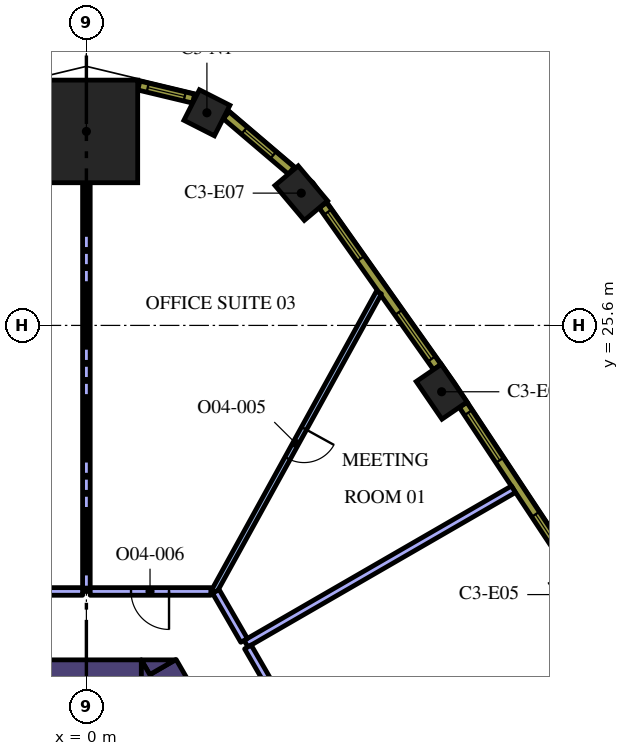
"""IFC4 building model, lengths in metres.
Left out: names, types, materials, properties, quantities, classifications, styles, units other than length and angle.
Written with IfcOpenShell. Run it as: python <this file> out.ifc"""

import sys

from ifc_helpers import new_model, si_unit, direction, frame, frame_2d, origin, origin_2d, place, context, subcontext, project, spatial, polyline, rectangle, outline, extrude, element, fill, save


model = new_model("IFC4")
c1 = context("Model", 3, precision=1e-05, world=origin(), true_north=direction((0.0, 1.0)))
c2 = subcontext(c1, "Body", "Model", "MODEL_VIEW")
j1 = project(units=[si_unit("LENGTHUNIT", "METRE"), si_unit("PLANEANGLEUNIT", "RADIAN")], contexts=[c1])
p1 = place(None, origin())
s1 = spatial("IfcSite", under=j1, at=p1, CompositionType="ELEMENT")
p2 = place(p1, origin())
s2 = spatial("IfcBuilding", under=s1, at=p2, CompositionType="ELEMENT")
p3 = place(p2, frame((0.0, 0.0, 187.8)))
s3 = spatial("IfcBuildingStorey", under=s2, at=p3, CompositionType="ELEMENT", Elevation=187.8)
p4 = place(p3, frame((0.0, 30.704, 0.0), z_axis=(0.0, 0.0, 1.0), x_axis=(0.0, 1.0, 0.0)))
e1 = element("IfcColumn", 1, at=p4, inside=s3, PredefinedType="COLUMN", context=c2, shape_type="SweptSolid", body=[
    extrude(rectangle(XDim=2.7, YDim=2.7, at=origin_2d()), origin(), (0.0, 0.0, 1.0), 4.2),
])
for number, where, z_axis, x_axis in (
    (2, (9.348, 23.854, 0.0), (0.0, 0.0, 1.0), (-0.565, 0.825, 0.0)),
    (3, (5.654, 29.081, 0.0), (0.0, 0.0, 1.0), (-0.644, 0.765, 0.0)),
):
    element("IfcColumn", number, at=place(p3, frame(where, z_axis=z_axis, x_axis=x_axis)), inside=s3, PredefinedType="COLUMN", context=c2, shape_type="SweptSolid", body=[
        extrude(rectangle(XDim=1.2, YDim=0.8, at=origin_2d()), origin(), (0.0, 0.0, 1.0), 4.2),
    ])
p5 = place(p3, frame((3.171, 31.195, 0.0), z_axis=(0.0, 0.0, 1.0), x_axis=(-0.891486197647, 0.453047855535, 0.0)))
e4 = element("IfcColumn", 4, at=p5, inside=s3, PredefinedType="COLUMN", context=c2, shape_type="SweptSolid", body=[
    extrude(rectangle(XDim=0.9, YDim=0.9, at=origin_2d()), origin(), (0.0, 0.0, 1.0), 4.2),
])
p6 = place(p3, frame((5.549, 10.489, 0.0), z_axis=(0.0, 0.0, 1.0), x_axis=(-0.50001746176, 0.866015321998, 0.0)))
e5 = element("IfcWall", 5, at=p6, inside=s3, PredefinedType="SOLIDWALL", context=c2, shape_type="SweptSolid", body=[
    extrude(rectangle(XDim=7.068, YDim=0.8, at=frame_2d((3.534, 0.0))), origin(), (0.0, 0.0, 1.0), 4.2),
])
p7 = place(p3, origin())
e6 = element("IfcWall", 6, at=p7, inside=s3, PredefinedType="SOLIDWALL", context=c2, shape_type="SweptSolid", body=[
    extrude(outline(polyline([(1.443, 16.8), (2.339, 16.8), (1.667, 16.412), (1.443, 16.8)])), origin(), (0.0, 0.0, 1.0), 4.2),
])
p8 = place(p3, frame((-2.379, 16.4, 0.0), z_axis=(0.0, 0.0, 1.0), x_axis=(1.0, 0.0, 0.0)))
e7 = element("IfcWall", 7, at=p8, inside=s3, PredefinedType="SOLIDWALL", context=c2, shape_type="SweptSolid", body=[
    extrude(rectangle(XDim=3.824, YDim=0.8, at=frame_2d((1.912, 0.0))), origin(), (0.0, 0.0, 1.0), 4.2),
])
e8 = element("IfcWall", 8, at=p7, inside=s3, PredefinedType="SOLIDWALL", context=c2, shape_type="SweptSolid", body=[
    extrude(outline(polyline([(1.905, 16.0), (1.447, 16.0), (1.447, 16.793), (1.905, 16.0)])), origin(), (0.0, 0.0, 1.0), 4.2),
])
p9 = place(p3, frame((4.2, 17.226, 0.0), z_axis=(0.0, 0.0, 1.0), x_axis=(0.866021486214, 0.500006785369, 0.0)))
e9 = element("IfcWall", 9, at=p9, inside=s3, PredefinedType="PARTITIONING", context=c2, shape_type="SweptSolid", body=[
    extrude(rectangle(XDim=8.126, YDim=0.2, at=frame_2d((4.063, 0.0))), origin(), (0.0, 0.0, 1.0), 3.15),
])
p10 = place(p3, frame((8.844, 9.182, 0.0), z_axis=(0.0, 0.0, 1.0), x_axis=(-0.50000000053, 0.866025403479, 0.0)))
e10 = element("IfcWall", 10, at=p10, inside=s3, PredefinedType="PARTITIONING", context=c2, shape_type="SweptSolid", body=[
    extrude(rectangle(XDim=9.188, YDim=0.2, at=frame_2d((4.594, 0.0))), origin(), (0.0, 0.0, 1.0), 3.15),
])
p11 = place(p10, frame((4.1, 0.0, 0.0)))
e11 = element("IfcOpeningElement", 11, at=p11, cuts=e10, PredefinedType="OPENING", context=c2, shape_type="SweptSolid", body=[
    extrude(rectangle(XDim=1.0, YDim=2.1, at=frame_2d((0.5, 1.05))), frame((0.0, 0.11, 0.0), z_axis=(0.0, -1.0, 0.0), x_axis=(1.0, 0.0, 0.0)), (0.0, 0.0, 1.0), 0.22),
])
p12 = place(p3, frame((7.698, 26.465, 0.0), z_axis=(0.0, 0.0, 1.0), x_axis=(-0.482998301798, -0.875621288263, 0.0)))
e12 = element("IfcWall", 12, at=p12, inside=s3, PredefinedType="PARTITIONING", context=c2, shape_type="SweptSolid", body=[
    extrude(rectangle(XDim=8.982, YDim=0.15, at=frame_2d((4.491, 0.0))), origin(), (0.0, 0.0, 1.0), 3.15),
])
p13 = place(p12, frame((4.083, 0.0, 0.0)))
e13 = element("IfcOpeningElement", 13, at=p13, cuts=e12, PredefinedType="OPENING", context=c2, shape_type="SweptSolid", body=[
    extrude(rectangle(XDim=0.9, YDim=2.1, at=frame_2d((0.45, 1.05))), frame((0.0, 0.085, 0.0), z_axis=(0.0, -1.0, 0.0), x_axis=(1.0, 0.0, 0.0)), (0.0, 0.0, 1.0), 0.17),
])
p14 = place(p3, frame((4.15, 17.312, 0.0), z_axis=(0.0, 0.0, 1.0), x_axis=(-0.499935638681, 0.86606255962, 0.0)))
e14 = element("IfcWall", 14, at=p14, inside=s3, PredefinedType="PARTITIONING", context=c2, shape_type="SweptSolid", body=[
    extrude(rectangle(XDim=1.487, YDim=0.2, at=frame_2d((0.744, 0.0))), origin(), (0.0, 0.0, 1.0), 3.15),
])
p15 = place(p3, frame((0.0, 18.6, 0.0), z_axis=(0.0, 0.0, 1.0), x_axis=(0.0, 1.0, 0.0)))
e15 = element("IfcWall", 15, at=p15, inside=s3, PredefinedType="PARTITIONING", context=c2, shape_type="SweptSolid", body=[
    extrude(rectangle(XDim=10.754, YDim=0.2, at=frame_2d((5.377, 0.0))), origin(), (0.0, 0.0, 1.0), 3.15),
])
p16 = place(p3, frame((3.274, 18.6, 0.0), z_axis=(0.0, 0.0, 1.0), x_axis=(-1.0, 0.0, 0.0)))
e16 = element("IfcWall", 16, at=p16, inside=s3, PredefinedType="PARTITIONING", context=c2, shape_type="SweptSolid", body=[
    extrude(rectangle(XDim=3.174, YDim=0.2, at=frame_2d((1.587, 0.0))), origin(), (0.0, 0.0, 1.0), 3.15),
])
p17 = place(p16, frame((1.1, 0.0, 0.0)))
e17 = element("IfcOpeningElement", 17, at=p17, cuts=e16, PredefinedType="OPENING", context=c2, shape_type="SweptSolid", body=[
    extrude(rectangle(XDim=1.0, YDim=2.1, at=frame_2d((0.5, 1.05))), frame((0.0, 0.11, 0.0), z_axis=(0.0, -1.0, 0.0), x_axis=(1.0, 0.0, 0.0)), (0.0, 0.0, 1.0), 0.22),
])
p18 = place(p3, frame((-0.1, 18.6, 0.0), z_axis=(0.0, 0.0, 1.0), x_axis=(-1.0, 0.0, 0.0)))
e18 = element("IfcWall", 18, at=p18, inside=s3, PredefinedType="PARTITIONING", context=c2, shape_type="SweptSolid", body=[
    extrude(rectangle(XDim=3.306, YDim=0.2, at=frame_2d((1.653, 0.0))), origin(), (0.0, 0.0, 1.0), 3.15),
])
p19 = place(p3, frame((12.783, 19.171, 0.0), z_axis=(0.0, 0.0, 1.0), x_axis=(-0.551892811511, 0.833915058386, 0.0)))
e19 = element("IfcWall", 19, at=p19, inside=s3, PredefinedType="SOLIDWALL", context=c2, shape_type="SweptSolid", body=[
    extrude(rectangle(XDim=5.204, YDim=0.24, at=frame_2d((2.602, 0.0))), origin(), (0.0, 0.0, 1.0), 3.95),
])
p20 = place(p19, frame((0.248, 0.0, 0.9)))
e20 = element("IfcOpeningElement", 20, at=p20, cuts=e19, PredefinedType="OPENING", context=c2, shape_type="SweptSolid", body=[
    extrude(rectangle(XDim=1.5, YDim=2.55, at=frame_2d((0.75, 1.275))), frame((0.0, 0.13, 0.0), z_axis=(0.0, -1.0, 0.0), x_axis=(1.0, 0.0, 0.0)), (0.0, 0.0, 1.0), 0.26),
])
p21 = place(p19, frame((3.455, 0.0, 0.9)))
e21 = element("IfcOpeningElement", 21, at=p21, cuts=e19, PredefinedType="OPENING", context=c2, shape_type="SweptSolid", body=[
    extrude(rectangle(XDim=1.5, YDim=2.55, at=frame_2d((0.75, 1.275))), frame((0.0, 0.13, 0.0), z_axis=(0.0, -1.0, 0.0), x_axis=(1.0, 0.0, 0.0)), (0.0, 0.0, 1.0), 0.26),
])
p22 = place(p3, frame((9.231, 24.504, 0.0), z_axis=(0.0, 0.0, 1.0), x_axis=(-0.577115207679, 0.816662743772, 0.0)))
e22 = element("IfcWall", 22, at=p22, inside=s3, PredefinedType="SOLIDWALL", context=c2, shape_type="SweptSolid", body=[
    extrude(rectangle(XDim=5.213, YDim=0.24, at=frame_2d((2.606, 0.0))), origin(), (0.0, 0.0, 1.0), 3.95),
])
p23 = place(p22, frame((0.261, 0.0, 0.9)))
e23 = element("IfcOpeningElement", 23, at=p23, cuts=e22, PredefinedType="OPENING", context=c2, shape_type="SweptSolid", body=[
    extrude(rectangle(XDim=1.5, YDim=2.55, at=frame_2d((0.75, 1.275))), frame((0.0, 0.13, 0.0), z_axis=(0.0, -1.0, 0.0), x_axis=(1.0, 0.0, 0.0)), (0.0, 0.0, 1.0), 0.26),
])
p24 = place(p22, frame((3.492, 0.0, 0.9)))
e24 = element("IfcOpeningElement", 24, at=p24, cuts=e22, PredefinedType="OPENING", context=c2, shape_type="SweptSolid", body=[
    extrude(rectangle(XDim=1.5, YDim=2.55, at=frame_2d((0.75, 1.275))), frame((0.0, 0.13, 0.0), z_axis=(0.0, -1.0, 0.0), x_axis=(1.0, 0.0, 0.0)), (0.0, 0.0, 1.0), 0.26),
])
p25 = place(p3, frame((5.392, 29.672, 0.0), z_axis=(0.0, 0.0, 1.0), x_axis=(-0.761419744247, 0.648259186645, 0.0)))
e25 = element("IfcWall", 25, at=p25, inside=s3, PredefinedType="SOLIDWALL", context=c2, shape_type="SweptSolid", body=[
    extrude(rectangle(XDim=2.25, YDim=0.24, at=frame_2d((1.125, 0.0))), origin(), (0.0, 0.0, 1.0), 3.95),
])
p26 = place(p25, frame((0.625, 0.0, 0.9)))
e26 = element("IfcOpeningElement", 26, at=p26, cuts=e25, PredefinedType="OPENING", context=c2, shape_type="SweptSolid", body=[
    extrude(rectangle(XDim=1.0, YDim=2.55, at=frame_2d((0.5, 1.275))), frame((0.0, 0.13, 0.0), z_axis=(0.0, -1.0, 0.0), x_axis=(1.0, 0.0, 0.0)), (0.0, 0.0, 1.0), 0.26),
])
p27 = place(p3, frame((2.821, 31.566, 0.0), z_axis=(0.0, 0.0, 1.0), x_axis=(-0.972479955788, 0.232986556673, 0.0)))
e27 = element("IfcWall", 27, at=p27, inside=s3, PredefinedType="SOLIDWALL", context=c2, shape_type="SweptSolid", body=[
    extrude(rectangle(XDim=1.482, YDim=0.24, at=frame_2d((0.741, 0.0))), origin(), (0.0, 0.0, 1.0), 3.95),
])
p28 = place(p27, frame((0.241, 0.0, 0.9)))
e28 = element("IfcOpeningElement", 28, at=p28, cuts=e27, PredefinedType="OPENING", context=c2, shape_type="SweptSolid", body=[
    extrude(rectangle(XDim=1.0, YDim=2.55, at=frame_2d((0.5, 1.275))), frame((0.0, 0.13, 0.0), z_axis=(0.0, -1.0, 0.0), x_axis=(1.0, 0.0, 0.0)), (0.0, 0.0, 1.0), 0.26),
])
p29 = place(p13, origin())
e29 = element("IfcDoor", 29, at=p29, inside=s3, OperationType="SINGLE_SWING_RIGHT", PredefinedType="DOOR", context=c2, shape_type="SweptSolid", body=[
    extrude(rectangle(XDim=0.9, YDim=2.1, at=frame_2d((0.45, 1.05))), frame((0.0, 0.025, 0.0), z_axis=(0.0, -1.0, 0.0), x_axis=(1.0, 0.0, 0.0)), (0.0, 0.0, 1.0), 0.05),
])
fill(e13, e29)
p30 = place(p17, origin())
e30 = element("IfcDoor", 30, at=p30, inside=s3, OperationType="SINGLE_SWING_RIGHT", PredefinedType="DOOR", context=c2, shape_type="SweptSolid", body=[
    extrude(rectangle(XDim=1.0, YDim=2.1, at=frame_2d((0.5, 1.05))), frame((0.0, 0.025, 0.0), z_axis=(0.0, -1.0, 0.0), x_axis=(1.0, 0.0, 0.0)), (0.0, 0.0, 1.0), 0.05),
])
fill(e17, e30)
p31 = place(p20, origin())
e31 = element("IfcWindow", 31, at=p31, inside=s3, PartitioningType="SINGLE_PANEL", PredefinedType="WINDOW", context=c2, shape_type="SweptSolid", body=[
    extrude(rectangle(XDim=1.5, YDim=2.55, at=frame_2d((0.75, 1.275))), frame((0.0, 0.04, 0.0), z_axis=(0.0, -1.0, 0.0), x_axis=(1.0, 0.0, 0.0)), (0.0, 0.0, 1.0), 0.06),
])
fill(e20, e31)
p32 = place(p21, origin())
e32 = element("IfcWindow", 32, at=p32, inside=s3, PartitioningType="SINGLE_PANEL", PredefinedType="WINDOW", context=c2, shape_type="SweptSolid", body=[
    extrude(rectangle(XDim=1.5, YDim=2.55, at=frame_2d((0.75, 1.275))), frame((0.0, 0.04, 0.0), z_axis=(0.0, -1.0, 0.0), x_axis=(1.0, 0.0, 0.0)), (0.0, 0.0, 1.0), 0.06),
])
fill(e21, e32)
p33 = place(p23, origin())
e33 = element("IfcWindow", 33, at=p33, inside=s3, PartitioningType="SINGLE_PANEL", PredefinedType="WINDOW", context=c2, shape_type="SweptSolid", body=[
    extrude(rectangle(XDim=1.5, YDim=2.55, at=frame_2d((0.75, 1.275))), frame((0.0, 0.04, 0.0), z_axis=(0.0, -1.0, 0.0), x_axis=(1.0, 0.0, 0.0)), (0.0, 0.0, 1.0), 0.06),
])
fill(e23, e33)
p34 = place(p24, origin())
e34 = element("IfcWindow", 34, at=p34, inside=s3, PartitioningType="SINGLE_PANEL", PredefinedType="WINDOW", context=c2, shape_type="SweptSolid", body=[
    extrude(rectangle(XDim=1.5, YDim=2.55, at=frame_2d((0.75, 1.275))), frame((0.0, 0.04, 0.0), z_axis=(0.0, -1.0, 0.0), x_axis=(1.0, 0.0, 0.0)), (0.0, 0.0, 1.0), 0.06),
])
fill(e24, e34)
p35 = place(p26, origin())
e35 = element("IfcWindow", 35, at=p35, inside=s3, PartitioningType="SINGLE_PANEL", PredefinedType="WINDOW", context=c2, shape_type="SweptSolid", body=[
    extrude(rectangle(XDim=1.0, YDim=2.55, at=frame_2d((0.5, 1.275))), frame((0.0, 0.04, 0.0), z_axis=(0.0, -1.0, 0.0), x_axis=(1.0, 0.0, 0.0)), (0.0, 0.0, 1.0), 0.06),
])
fill(e26, e35)
p36 = place(p28, origin())
e36 = element("IfcWindow", 36, at=p36, inside=s3, PartitioningType="SINGLE_PANEL", PredefinedType="WINDOW", context=c2, shape_type="SweptSolid", body=[
    extrude(rectangle(XDim=1.0, YDim=2.55, at=frame_2d((0.5, 1.275))), frame((0.0, 0.04, 0.0), z_axis=(0.0, -1.0, 0.0), x_axis=(1.0, 0.0, 0.0)), (0.0, 0.0, 1.0), 0.06),
])
fill(e28, e36)
save(model, sys.argv[1])
